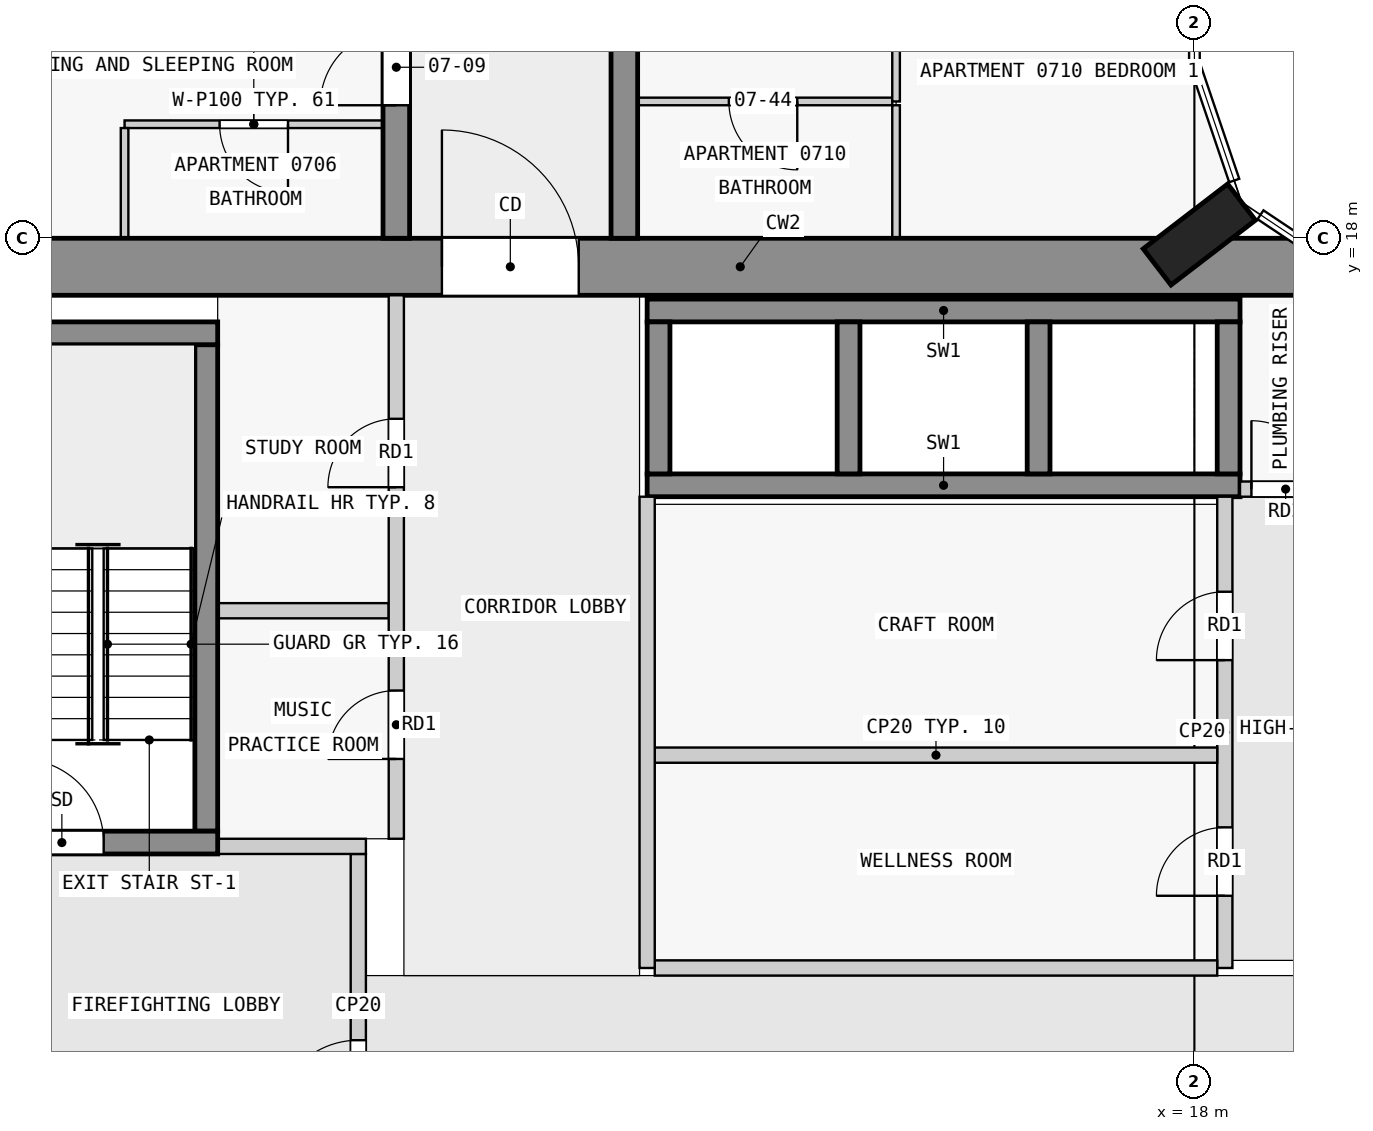
"""IFC4 building model, lengths in metres.
Left out: names, types, materials, properties, quantities, classifications, styles, units other than length and angle.
Written with IfcOpenShell. Run it as: python <this file> out.ifc"""

import sys

from ifc_helpers import new_model, si_unit, direction, frame, frame_2d, origin, origin_2d, place, context, subcontext, project, spatial, rectangle, extrude, element, fill, save


model = new_model("IFC4")
c1 = context("Model", 3, precision=1e-05, world=origin(), true_north=direction((0.0, 1.0)))
c2 = subcontext(c1, "Body", "Model", "MODEL_VIEW")
j1 = project(units=[si_unit("LENGTHUNIT", "METRE"), si_unit("PLANEANGLEUNIT", "RADIAN")], contexts=[c1])
p1 = place(None, origin())
s1 = spatial("IfcSite", under=j1, at=p1, CompositionType="ELEMENT")
p2 = place(p1, origin())
s2 = spatial("IfcBuilding", under=s1, at=p2, CompositionType="ELEMENT")
p3 = place(p2, frame((0.0, 0.0, 33.8)))
s3 = spatial("IfcBuildingStorey", under=s2, at=p3, CompositionType="ELEMENT", Elevation=33.8)
p4 = place(p3, frame((18.065, 18.05, 0.0), z_axis=(0.0, 0.0, 1.0), x_axis=(-0.608810846443, 0.793315418515, 0.0)))
e1 = element("IfcColumn", 1, at=p4, inside=s3, PredefinedType="COLUMN", context=c2, shape_type="SweptSolid", body=[
    extrude(rectangle(XDim=0.6, YDim=1.4, at=origin_2d()), origin(), (0.0, 0.0, 1.0), 3.5),
])
p5 = place(p3, frame((1.55, 17.625, 0.0), z_axis=(0.0, 0.0, 1.0), x_axis=(1.0, 0.0, 0.0)))
e2 = element("IfcWall", 2, at=p5, inside=s3, PredefinedType="SHEAR", context=c2, shape_type="SweptSolid", body=[
    extrude(rectangle(XDim=20.95, YDim=0.75, at=frame_2d((10.475, 0.0))), origin(), (0.0, 0.0, 1.0), 3.25),
])
p6 = place(p5, frame((6.55, 0.0, 0.0)))
e3 = element("IfcOpeningElement", 3, at=p6, cuts=e2, PredefinedType="OPENING", context=c2, shape_type="SweptSolid", body=[
    extrude(rectangle(XDim=1.8, YDim=2.1, at=frame_2d((0.9, 1.05))), frame((0.0, 0.385, 0.0), z_axis=(0.0, -1.0, 0.0), x_axis=(1.0, 0.0, 0.0)), (0.0, 0.0, 1.0), 0.77),
])
p7 = place(p3, frame((2.3, 10.05, 0.0), z_axis=(0.0, 0.0, 1.0), x_axis=(1.0, 0.0, 0.0)))
e4 = element("IfcWall", 4, at=p7, inside=s3, PredefinedType="SHEAR", context=c2, shape_type="SweptSolid", body=[
    extrude(rectangle(XDim=2.85, YDim=0.3, at=frame_2d((1.425, 0.0))), origin(), (0.0, 0.0, 1.0), 3.25),
])
p8 = place(p7, frame((0.25, 0.0, 0.0)))
e5 = element("IfcOpeningElement", 5, at=p8, cuts=e4, PredefinedType="OPENING", context=c2, shape_type="SweptSolid", body=[
    extrude(rectangle(XDim=1.1, YDim=2.1, at=frame_2d((0.55, 1.05))), frame((0.0, 0.16, 0.0), z_axis=(0.0, -1.0, 0.0), x_axis=(1.0, 0.0, 0.0)), (0.0, 0.0, 1.0), 0.32),
])
p9 = place(p3, frame((5.0, 10.2, 0.0), z_axis=(0.0, 0.0, 1.0), x_axis=(0.0, 1.0, 0.0)))
e6 = element("IfcWall", 6, at=p9, inside=s3, PredefinedType="SHEAR", context=c2, shape_type="SweptSolid", body=[
    extrude(rectangle(XDim=6.4, YDim=0.3, at=frame_2d((3.2, 0.0))), origin(), (0.0, 0.0, 1.0), 3.25),
])
p10 = place(p3, frame((2.3, 16.75, 0.0), z_axis=(0.0, 0.0, 1.0), x_axis=(1.0, 0.0, 0.0)))
e7 = element("IfcWall", 7, at=p10, inside=s3, PredefinedType="SHEAR", context=c2, shape_type="SweptSolid", body=[
    extrude(rectangle(XDim=2.85, YDim=0.3, at=frame_2d((1.425, 0.0))), origin(), (0.0, 0.0, 1.0), 3.25),
])
for number, where, z_axis, x_axis in (
    (8, (10.8, 17.05, 0.0), (0.0, 0.0, 1.0), (1.0, 0.0, 0.0)),
    (9, (10.8, 14.75, 0.0), (0.0, 0.0, 1.0), (1.0, 0.0, 0.0)),
):
    element("IfcWall", number, at=place(p3, frame(where, z_axis=z_axis, x_axis=x_axis)), inside=s3, PredefinedType="SHEAR", context=c2, shape_type="SweptSolid", body=[
        extrude(rectangle(XDim=7.8, YDim=0.3, at=frame_2d((3.9, 0.0))), origin(), (0.0, 0.0, 1.0), 3.25),
    ])
for number, where, z_axis, x_axis in (
    (10, (10.95, 14.9, 0.0), (0.0, 0.0, 1.0), (0.0, 1.0, 0.0)),
    (11, (13.45, 14.9, 0.0), (0.0, 0.0, 1.0), (0.0, 1.0, 0.0)),
    (12, (15.95, 14.9, 0.0), (0.0, 0.0, 1.0), (0.0, 1.0, 0.0)),
    (13, (18.45, 14.9, 0.0), (0.0, 0.0, 1.0), (0.0, 1.0, 0.0)),
):
    element("IfcWall", number, at=place(p3, frame(where, z_axis=z_axis, x_axis=x_axis)), inside=s3, PredefinedType="SHEAR", context=c2, shape_type="SweptSolid", body=[
        extrude(rectangle(XDim=2.0, YDim=0.3, at=frame_2d((1.0, 0.0))), origin(), (0.0, 0.0, 1.0), 3.25),
    ])
p11 = place(p3, frame((7.5, 18.0, 0.0), z_axis=(0.0, 0.0, 1.0), x_axis=(0.0, 1.0, 0.0)))
e14 = element("IfcWall", 14, at=p11, inside=s3, PredefinedType="SHEAR", context=c2, shape_type="SweptSolid", body=[
    extrude(rectangle(XDim=27.0, YDim=0.35, at=frame_2d((13.5, 0.0))), origin(), (0.0, 0.0, 1.0), 3.25),
])
p12 = place(p11, frame((1.75, 0.0, 0.0)))
e15 = element("IfcOpeningElement", 15, at=p12, cuts=e14, PredefinedType="OPENING", context=c2, shape_type="SweptSolid", body=[
    extrude(rectangle(XDim=1.0, YDim=2.1, at=frame_2d((0.5, 1.05))), frame((0.0, 0.185, 0.0), z_axis=(0.0, -1.0, 0.0), x_axis=(1.0, 0.0, 0.0)), (0.0, 0.0, 1.0), 0.37),
])
p13 = place(p11, frame((8.55, 0.0, 0.0)))
e16 = element("IfcOpeningElement", 16, at=p13, cuts=e14, PredefinedType="OPENING", context=c2, shape_type="SweptSolid", body=[
    extrude(rectangle(XDim=1.0, YDim=2.1, at=frame_2d((0.5, 1.05))), frame((0.0, 0.185, 0.0), z_axis=(0.0, -1.0, 0.0), x_axis=(1.0, 0.0, 0.0)), (0.0, 0.0, 1.0), 0.37),
])
p14 = place(p11, frame((15.25, 0.0, 0.0)))
e17 = element("IfcOpeningElement", 17, at=p14, cuts=e14, PredefinedType="OPENING", context=c2, shape_type="SweptSolid", body=[
    extrude(rectangle(XDim=1.0, YDim=2.1, at=frame_2d((0.5, 1.05))), frame((0.0, 0.185, 0.0), z_axis=(0.0, -1.0, 0.0), x_axis=(1.0, 0.0, 0.0)), (0.0, 0.0, 1.0), 0.37),
])
p15 = place(p11, frame((21.35, 0.0, 0.0)))
e18 = element("IfcOpeningElement", 18, at=p15, cuts=e14, PredefinedType="OPENING", context=c2, shape_type="SweptSolid", body=[
    extrude(rectangle(XDim=1.0, YDim=2.1, at=frame_2d((0.5, 1.05))), frame((0.0, 0.185, 0.0), z_axis=(0.0, -1.0, 0.0), x_axis=(1.0, 0.0, 0.0)), (0.0, 0.0, 1.0), 0.37),
])
p16 = place(p3, frame((10.5, 18.0, 0.0), z_axis=(0.0, 0.0, 1.0), x_axis=(0.0, 1.0, 0.0)))
e19 = element("IfcWall", 19, at=p16, inside=s3, PredefinedType="SHEAR", context=c2, shape_type="SweptSolid", body=[
    extrude(rectangle(XDim=27.0, YDim=0.35, at=frame_2d((13.5, 0.0))), origin(), (0.0, 0.0, 1.0), 3.25),
])
p17 = place(p16, frame((7.45, 0.0, 0.0)))
e20 = element("IfcOpeningElement", 20, at=p17, cuts=e19, PredefinedType="OPENING", context=c2, shape_type="SweptSolid", body=[
    extrude(rectangle(XDim=1.0, YDim=2.1, at=frame_2d((0.5, 1.05))), frame((0.0, 0.185, 0.0), z_axis=(0.0, -1.0, 0.0), x_axis=(1.0, 0.0, 0.0)), (0.0, 0.0, 1.0), 0.37),
])
p18 = place(p16, frame((19.75, 0.0, 0.0)))
e21 = element("IfcOpeningElement", 21, at=p18, cuts=e19, PredefinedType="OPENING", context=c2, shape_type="SweptSolid", body=[
    extrude(rectangle(XDim=1.0, YDim=2.1, at=frame_2d((0.5, 1.05))), frame((0.0, 0.185, 0.0), z_axis=(0.0, -1.0, 0.0), x_axis=(1.0, 0.0, 0.0)), (0.0, 0.0, 1.0), 0.37),
])
p19 = place(p16, frame((23.25, 0.0, 0.0)))
e22 = element("IfcOpeningElement", 22, at=p19, cuts=e19, PredefinedType="OPENING", context=c2, shape_type="SweptSolid", body=[
    extrude(rectangle(XDim=0.9, YDim=2.1, at=frame_2d((0.45, 1.05))), frame((0.0, 0.185, 0.0), z_axis=(0.0, -1.0, 0.0), x_axis=(1.0, 0.0, 0.0)), (0.0, 0.0, 1.0), 0.37),
])
p20 = place(p16, frame((25.45, 0.0, 0.0)))
e23 = element("IfcOpeningElement", 23, at=p20, cuts=e19, PredefinedType="OPENING", context=c2, shape_type="SweptSolid", body=[
    extrude(rectangle(XDim=1.0, YDim=2.1, at=frame_2d((0.5, 1.05))), frame((0.0, 0.185, 0.0), z_axis=(0.0, -1.0, 0.0), x_axis=(1.0, 0.0, 0.0)), (0.0, 0.0, 1.0), 0.37),
])
p21 = place(p3, frame((7.0, 5.9, 0.0), z_axis=(0.0, 0.0, 1.0), x_axis=(0.0, 1.0, 0.0)))
e24 = element("IfcWall", 24, at=p21, inside=s3, PredefinedType="PARTITIONING", context=c2, shape_type="SweptSolid", body=[
    extrude(rectangle(XDim=4.0, YDim=0.2, at=frame_2d((2.0, 0.0))), origin(), (0.0, 0.0, 1.0), 3.25),
])
p22 = place(p21, frame((0.45, 0.0, 0.0)))
e25 = element("IfcOpeningElement", 25, at=p22, cuts=e24, PredefinedType="OPENING", context=c2, shape_type="SweptSolid", body=[
    extrude(rectangle(XDim=1.1, YDim=2.1, at=frame_2d((0.55, 1.05))), frame((0.0, 0.11, 0.0), z_axis=(0.0, -1.0, 0.0), x_axis=(1.0, 0.0, 0.0)), (0.0, 0.0, 1.0), 0.22),
])
p23 = place(p3, frame((5.15, 10.0, 0.0), z_axis=(0.0, 0.0, 1.0), x_axis=(1.0, 0.0, 0.0)))
e26 = element("IfcWall", 26, at=p23, inside=s3, PredefinedType="PARTITIONING", context=c2, shape_type="SweptSolid", body=[
    extrude(rectangle(XDim=1.95, YDim=0.2, at=frame_2d((0.975, 0.0))), origin(), (0.0, 0.0, 1.0), 3.25),
])
p24 = place(p3, frame((10.8, 8.4, 0.0), z_axis=(0.0, 0.0, 1.0), x_axis=(0.0, 1.0, 0.0)))
e27 = element("IfcWall", 27, at=p24, inside=s3, PredefinedType="PARTITIONING", context=c2, shape_type="SweptSolid", body=[
    extrude(rectangle(XDim=6.2, YDim=0.2, at=frame_2d((3.1, 0.0))), origin(), (0.0, 0.0, 1.0), 3.25),
])
p25 = place(p3, frame((10.9, 8.4, 0.0), z_axis=(0.0, 0.0, 1.0), x_axis=(1.0, 0.0, 0.0)))
e28 = element("IfcWall", 28, at=p25, inside=s3, PredefinedType="PARTITIONING", context=c2, shape_type="SweptSolid", body=[
    extrude(rectangle(XDim=7.4, YDim=0.2, at=frame_2d((3.7, 0.0))), origin(), (0.0, 0.0, 1.0), 3.25),
])
p26 = place(p3, frame((18.4, 8.4, 0.0), z_axis=(0.0, 0.0, 1.0), x_axis=(0.0, 1.0, 0.0)))
e29 = element("IfcWall", 29, at=p26, inside=s3, PredefinedType="PARTITIONING", context=c2, shape_type="SweptSolid", body=[
    extrude(rectangle(XDim=6.2, YDim=0.2, at=frame_2d((3.1, 0.0))), origin(), (0.0, 0.0, 1.0), 3.25),
])
p27 = place(p26, frame((0.95, 0.0, 0.0)))
e30 = element("IfcOpeningElement", 30, at=p27, cuts=e29, PredefinedType="OPENING", context=c2, shape_type="SweptSolid", body=[
    extrude(rectangle(XDim=0.9, YDim=2.1, at=frame_2d((0.45, 1.05))), frame((0.0, 0.11, 0.0), z_axis=(0.0, -1.0, 0.0), x_axis=(1.0, 0.0, 0.0)), (0.0, 0.0, 1.0), 0.22),
])
p28 = place(p26, frame((4.05, 0.0, 0.0)))
e31 = element("IfcOpeningElement", 31, at=p28, cuts=e29, PredefinedType="OPENING", context=c2, shape_type="SweptSolid", body=[
    extrude(rectangle(XDim=0.9, YDim=2.1, at=frame_2d((0.45, 1.05))), frame((0.0, 0.11, 0.0), z_axis=(0.0, -1.0, 0.0), x_axis=(1.0, 0.0, 0.0)), (0.0, 0.0, 1.0), 0.22),
])
p29 = place(p3, frame((10.9, 11.2, 0.0), z_axis=(0.0, 0.0, 1.0), x_axis=(1.0, 0.0, 0.0)))
e32 = element("IfcWall", 32, at=p29, inside=s3, PredefinedType="PARTITIONING", context=c2, shape_type="SweptSolid", body=[
    extrude(rectangle(XDim=7.4, YDim=0.2, at=frame_2d((3.7, 0.0))), origin(), (0.0, 0.0, 1.0), 3.25),
])
p30 = place(p3, frame((7.5, 10.1, 0.0), z_axis=(0.0, 0.0, 1.0), x_axis=(0.0, 1.0, 0.0)))
e33 = element("IfcWall", 33, at=p30, inside=s3, PredefinedType="PARTITIONING", context=c2, shape_type="SweptSolid", body=[
    extrude(rectangle(XDim=7.15, YDim=0.2, at=frame_2d((3.575, 0.0))), origin(), (0.0, 0.0, 1.0), 3.25),
])
p31 = place(p30, frame((1.05, 0.0, 0.0)))
e34 = element("IfcOpeningElement", 34, at=p31, cuts=e33, PredefinedType="OPENING", context=c2, shape_type="SweptSolid", body=[
    extrude(rectangle(XDim=0.9, YDim=2.1, at=frame_2d((0.45, 1.05))), frame((0.0, 0.11, 0.0), z_axis=(0.0, -1.0, 0.0), x_axis=(1.0, 0.0, 0.0)), (0.0, 0.0, 1.0), 0.22),
])
p32 = place(p30, frame((4.625, 0.0, 0.0)))
e35 = element("IfcOpeningElement", 35, at=p32, cuts=e33, PredefinedType="OPENING", context=c2, shape_type="SweptSolid", body=[
    extrude(rectangle(XDim=0.9, YDim=2.1, at=frame_2d((0.45, 1.05))), frame((0.0, 0.11, 0.0), z_axis=(0.0, -1.0, 0.0), x_axis=(1.0, 0.0, 0.0)), (0.0, 0.0, 1.0), 0.22),
])
p33 = place(p3, frame((5.15, 13.1, 0.0), z_axis=(0.0, 0.0, 1.0), x_axis=(1.0, 0.0, 0.0)))
e36 = element("IfcWall", 36, at=p33, inside=s3, PredefinedType="PARTITIONING", context=c2, shape_type="SweptSolid", body=[
    extrude(rectangle(XDim=2.25, YDim=0.2, at=frame_2d((1.125, 0.0))), origin(), (0.0, 0.0, 1.0), 3.25),
])
p34 = place(p3, frame((18.6, 14.7, 0.0), z_axis=(0.0, 0.0, 1.0), x_axis=(1.0, 0.0, 0.0)))
e37 = element("IfcWall", 37, at=p34, inside=s3, PredefinedType="PARTITIONING", context=c2, shape_type="SweptSolid", body=[
    extrude(rectangle(XDim=3.15, YDim=0.2, at=frame_2d((1.575, 0.0))), origin(), (0.0, 0.0, 1.0), 3.25),
])
p35 = place(p34, frame((0.15, 0.0, 0.0)))
e38 = element("IfcOpeningElement", 38, at=p35, cuts=e37, PredefinedType="OPENING", context=c2, shape_type="SweptSolid", body=[
    extrude(rectangle(XDim=0.9, YDim=2.1, at=frame_2d((0.45, 1.05))), frame((0.0, 0.11, 0.0), z_axis=(0.0, -1.0, 0.0), x_axis=(1.0, 0.0, 0.0)), (0.0, 0.0, 1.0), 0.22),
])
p36 = place(p34, frame((1.725, 0.0, 0.0)))
e39 = element("IfcOpeningElement", 39, at=p36, cuts=e37, PredefinedType="OPENING", context=c2, shape_type="SweptSolid", body=[
    extrude(rectangle(XDim=0.9, YDim=2.1, at=frame_2d((0.45, 1.05))), frame((0.0, 0.11, 0.0), z_axis=(0.0, -1.0, 0.0), x_axis=(1.0, 0.0, 0.0)), (0.0, 0.0, 1.0), 0.22),
])
p37 = place(p3, frame((7.325, 19.5, 0.0), z_axis=(0.0, 0.0, 1.0), x_axis=(-1.0, 0.0, 0.0)))
e40 = element("IfcWall", 40, at=p37, inside=s3, PredefinedType="PARTITIONING", context=c2, shape_type="SweptSolid", body=[
    extrude(rectangle(XDim=3.4, YDim=0.1, at=frame_2d((1.7, 0.0))), origin(), (0.0, 0.0, 1.0), 3.25),
])
p38 = place(p37, frame((1.25, 0.0, 0.0)))
e41 = element("IfcOpeningElement", 41, at=p38, cuts=e40, PredefinedType="OPENING", context=c2, shape_type="SweptSolid", body=[
    extrude(rectangle(XDim=0.9, YDim=2.1, at=frame_2d((0.45, 1.05))), frame((0.0, 0.06, 0.0), z_axis=(0.0, -1.0, 0.0), x_axis=(1.0, 0.0, 0.0)), (0.0, 0.0, 1.0), 0.12),
])
p39 = place(p3, frame((14.025, 19.8, 0.0), z_axis=(0.0, 0.0, 1.0), x_axis=(-1.0, 0.0, 0.0)))
e42 = element("IfcWall", 42, at=p39, inside=s3, PredefinedType="PARTITIONING", context=c2, shape_type="SweptSolid", body=[
    extrude(rectangle(XDim=3.35, YDim=0.1, at=frame_2d((1.675, 0.0))), origin(), (0.0, 0.0, 1.0), 3.25),
])
p40 = place(p39, frame((1.25, 0.0, 0.0)))
e43 = element("IfcOpeningElement", 43, at=p40, cuts=e42, PredefinedType="OPENING", context=c2, shape_type="SweptSolid", body=[
    extrude(rectangle(XDim=0.9, YDim=2.1, at=frame_2d((0.45, 1.05))), frame((0.0, 0.06, 0.0), z_axis=(0.0, -1.0, 0.0), x_axis=(1.0, 0.0, 0.0)), (0.0, 0.0, 1.0), 0.12),
])
p41 = place(p3, frame((3.925, 19.45, 0.0), z_axis=(0.0, 0.0, 1.0), x_axis=(0.0, -1.0, 0.0)))
e44 = element("IfcWall", 44, at=p41, inside=s3, PredefinedType="PARTITIONING", context=c2, shape_type="SweptSolid", body=[
    extrude(rectangle(XDim=1.45, YDim=0.1, at=frame_2d((0.725, 0.0))), origin(), (0.0, 0.0, 1.0), 3.25),
])
p42 = place(p3, frame((14.075, 27.0, 0.0), z_axis=(0.0, 0.0, 1.0), x_axis=(0.0, -1.0, 0.0)))
e45 = element("IfcWall", 45, at=p42, inside=s3, PredefinedType="PARTITIONING", context=c2, shape_type="SweptSolid", body=[
    extrude(rectangle(XDim=7.2, YDim=0.1, at=frame_2d((3.6, 0.0))), origin(), (0.0, 0.0, 1.0), 3.25),
])
p43 = place(p42, frame((5.35, 0.0, 0.0)))
e46 = element("IfcOpeningElement", 46, at=p43, cuts=e45, PredefinedType="OPENING", context=c2, shape_type="SweptSolid", body=[
    extrude(rectangle(XDim=0.9, YDim=2.1, at=frame_2d((0.45, 1.05))), frame((0.0, 0.06, 0.0), z_axis=(0.0, -1.0, 0.0), x_axis=(1.0, 0.0, 0.0)), (0.0, 0.0, 1.0), 0.12),
])
p44 = place(p42, frame((1.85, 0.0, 0.0)))
e47 = element("IfcOpeningElement", 47, at=p44, cuts=e45, PredefinedType="OPENING", context=c2, shape_type="SweptSolid", body=[
    extrude(rectangle(XDim=0.9, YDim=2.1, at=frame_2d((0.45, 1.05))), frame((0.0, 0.06, 0.0), z_axis=(0.0, -1.0, 0.0), x_axis=(1.0, 0.0, 0.0)), (0.0, 0.0, 1.0), 0.12),
])
p45 = place(p3, frame((14.075, 18.0, 0.0), z_axis=(0.0, 0.0, 1.0), x_axis=(0.0, 1.0, 0.0)))
e48 = element("IfcWall", 48, at=p45, inside=s3, PredefinedType="PARTITIONING", context=c2, shape_type="SweptSolid", body=[
    extrude(rectangle(XDim=1.75, YDim=0.1, at=frame_2d((0.875, 0.0))), origin(), (0.0, 0.0, 1.0), 3.25),
])
p46 = place(p22, origin())
e49 = element("IfcDoor", 49, at=p46, inside=s3, OperationType="SINGLE_SWING_LEFT", PredefinedType="DOOR", context=c2, shape_type="SweptSolid", body=[
    extrude(rectangle(XDim=1.1, YDim=2.1, at=frame_2d((0.55, 1.05))), frame((0.0, 0.025, 0.0), z_axis=(0.0, -1.0, 0.0), x_axis=(1.0, 0.0, 0.0)), (0.0, 0.0, 1.0), 0.05),
])
fill(e25, e49)
p47 = place(p8, origin())
e50 = element("IfcDoor", 50, at=p47, inside=s3, OperationType="SINGLE_SWING_RIGHT", PredefinedType="DOOR", context=c2, shape_type="SweptSolid", body=[
    extrude(rectangle(XDim=1.1, YDim=2.1, at=frame_2d((0.55, 1.05))), frame((0.0, 0.025, 0.0), z_axis=(0.0, -1.0, 0.0), x_axis=(1.0, 0.0, 0.0)), (0.0, 0.0, 1.0), 0.05),
])
fill(e5, e50)
p48 = place(p27, origin())
e51 = element("IfcDoor", 51, at=p48, inside=s3, OperationType="SINGLE_SWING_LEFT", PredefinedType="DOOR", context=c2, shape_type="SweptSolid", body=[
    extrude(rectangle(XDim=0.9, YDim=2.1, at=frame_2d((0.45, 1.05))), frame((0.0, 0.025, 0.0), z_axis=(0.0, -1.0, 0.0), x_axis=(1.0, 0.0, 0.0)), (0.0, 0.0, 1.0), 0.05),
])
fill(e30, e51)
p49 = place(p28, origin())
e52 = element("IfcDoor", 52, at=p49, inside=s3, OperationType="SINGLE_SWING_LEFT", PredefinedType="DOOR", context=c2, shape_type="SweptSolid", body=[
    extrude(rectangle(XDim=0.9, YDim=2.1, at=frame_2d((0.45, 1.05))), frame((0.0, 0.025, 0.0), z_axis=(0.0, -1.0, 0.0), x_axis=(1.0, 0.0, 0.0)), (0.0, 0.0, 1.0), 0.05),
])
fill(e31, e52)
p50 = place(p6, origin())
e53 = element("IfcDoor", 53, at=p50, inside=s3, OperationType="DOUBLE_DOOR_SINGLE_SWING", PredefinedType="DOOR", context=c2, shape_type="SweptSolid", body=[
    extrude(rectangle(XDim=1.8, YDim=2.1, at=frame_2d((0.9, 1.05))), frame((0.0, 0.025, 0.0), z_axis=(0.0, -1.0, 0.0), x_axis=(1.0, 0.0, 0.0)), (0.0, 0.0, 1.0), 0.05),
])
fill(e3, e53)
p51 = place(p31, origin())
e54 = element("IfcDoor", 54, at=p51, inside=s3, OperationType="SINGLE_SWING_RIGHT", PredefinedType="DOOR", context=c2, shape_type="SweptSolid", body=[
    extrude(rectangle(XDim=0.9, YDim=2.1, at=frame_2d((0.45, 1.05))), frame((0.0, 0.025, 0.0), z_axis=(0.0, -1.0, 0.0), x_axis=(1.0, 0.0, 0.0)), (0.0, 0.0, 1.0), 0.05),
])
fill(e34, e54)
p52 = place(p32, origin())
e55 = element("IfcDoor", 55, at=p52, inside=s3, OperationType="SINGLE_SWING_RIGHT", PredefinedType="DOOR", context=c2, shape_type="SweptSolid", body=[
    extrude(rectangle(XDim=0.9, YDim=2.1, at=frame_2d((0.45, 1.05))), frame((0.0, 0.025, 0.0), z_axis=(0.0, -1.0, 0.0), x_axis=(1.0, 0.0, 0.0)), (0.0, 0.0, 1.0), 0.05),
])
fill(e35, e55)
p53 = place(p35, origin())
e56 = element("IfcDoor", 56, at=p53, inside=s3, OperationType="SINGLE_SWING_LEFT", PredefinedType="DOOR", context=c2, shape_type="SweptSolid", body=[
    extrude(rectangle(XDim=0.9, YDim=2.1, at=frame_2d((0.45, 1.05))), frame((0.0, 0.025, 0.0), z_axis=(0.0, -1.0, 0.0), x_axis=(1.0, 0.0, 0.0)), (0.0, 0.0, 1.0), 0.05),
])
fill(e38, e56)
p54 = place(p12, origin())
e57 = element("IfcDoor", 57, at=p54, inside=s3, OperationType="SINGLE_SWING_LEFT", PredefinedType="DOOR", context=c2, shape_type="SweptSolid", body=[
    extrude(rectangle(XDim=1.0, YDim=2.1, at=frame_2d((0.5, 1.05))), frame((0.0, 0.025, 0.0), z_axis=(0.0, -1.0, 0.0), x_axis=(1.0, 0.0, 0.0)), (0.0, 0.0, 1.0), 0.05),
])
fill(e15, e57)
p55 = place(p38, origin())
e58 = element("IfcDoor", 58, at=p55, inside=s3, OperationType="SINGLE_SWING_LEFT", PredefinedType="DOOR", context=c2, shape_type="SweptSolid", body=[
    extrude(rectangle(XDim=0.9, YDim=2.1, at=frame_2d((0.45, 1.05))), frame((0.0, 0.025, 0.0), z_axis=(0.0, -1.0, 0.0), x_axis=(1.0, 0.0, 0.0)), (0.0, 0.0, 1.0), 0.05),
])
fill(e41, e58)
p56 = place(p40, origin())
e59 = element("IfcDoor", 59, at=p56, inside=s3, OperationType="SINGLE_SWING_RIGHT", PredefinedType="DOOR", context=c2, shape_type="SweptSolid", body=[
    extrude(rectangle(XDim=0.9, YDim=2.1, at=frame_2d((0.45, 1.05))), frame((0.0, 0.025, 0.0), z_axis=(0.0, -1.0, 0.0), x_axis=(1.0, 0.0, 0.0)), (0.0, 0.0, 1.0), 0.05),
])
fill(e43, e59)
save(model, sys.argv[1])
